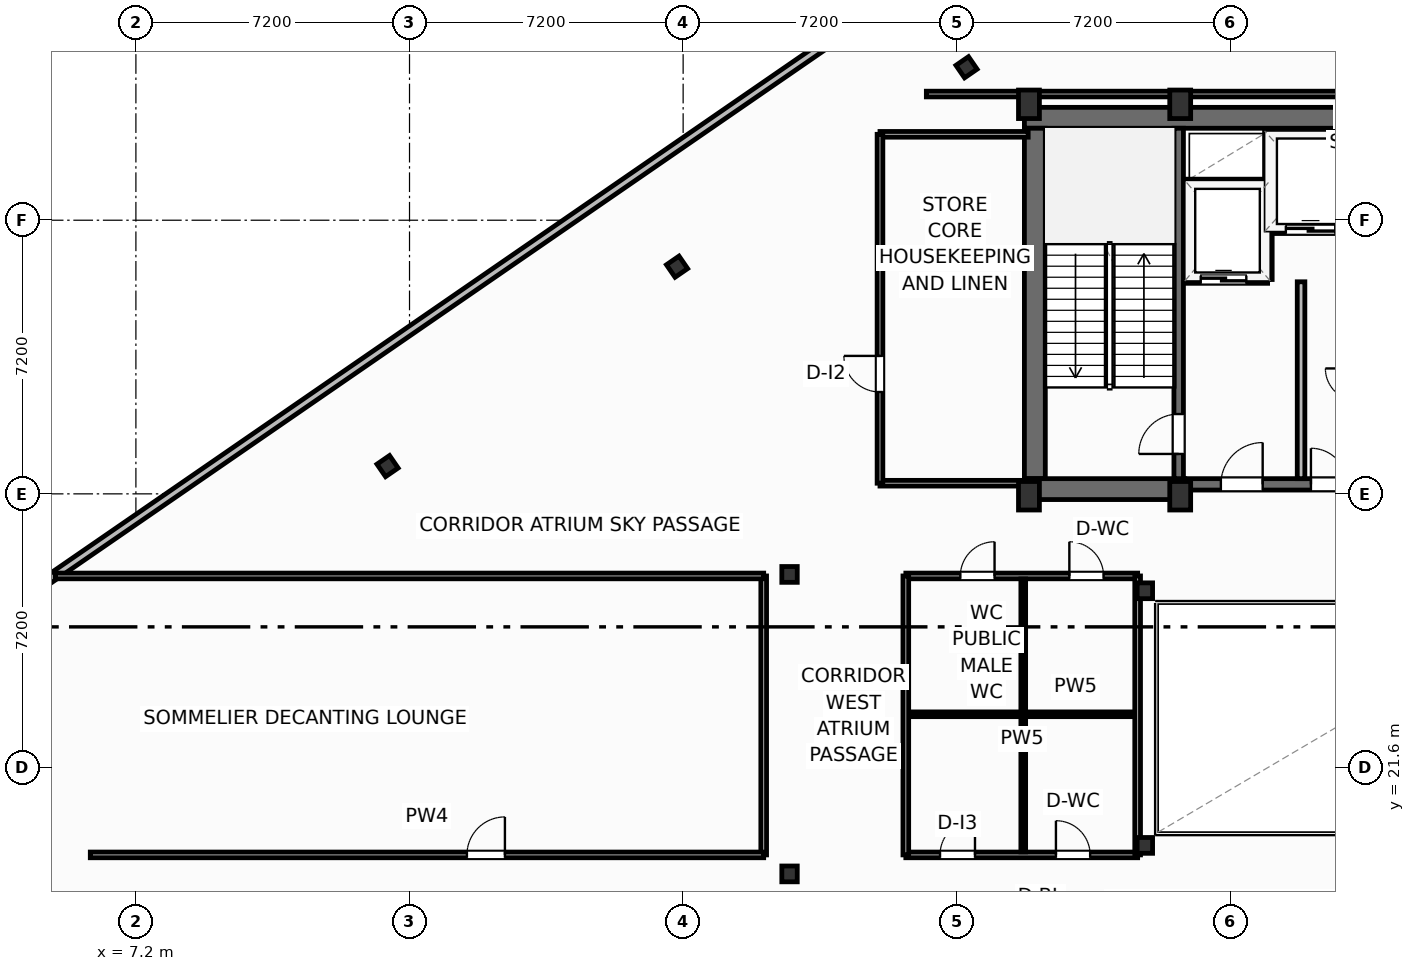
"""IFC4 building model, lengths in metres.
Left out: names, types, materials, properties, quantities, classifications, styles, units other than length and angle.
Written with IfcOpenShell. Run it as: python <this file> out.ifc"""

import sys

from ifc_helpers import new_model, si_unit, direction, frame, frame_2d, origin, origin_2d, place, context, subcontext, project, spatial, rectangle, i_section, extrude, element, fill, save


model = new_model("IFC4")
c1 = context("Model", 3, precision=1e-05, world=origin(), true_north=direction((0.0, 1.0)))
c2 = subcontext(c1, "Body", "Model", "MODEL_VIEW")
j1 = project(units=[si_unit("LENGTHUNIT", "METRE"), si_unit("PLANEANGLEUNIT", "RADIAN")], contexts=[c1])
p1 = place(None, origin())
s1 = spatial("IfcSite", under=j1, at=p1, CompositionType="ELEMENT")
p2 = place(p1, origin())
s2 = spatial("IfcBuilding", under=s1, at=p2, CompositionType="ELEMENT")
p3 = place(p2, frame((0.0, 0.0, 291.5)))
s3 = spatial("IfcBuildingStorey", under=s2, at=p3, CompositionType="ELEMENT", Elevation=291.5)
for number, where, z_axis, x_axis in (
    (1, (30.7, 28.75, 0.0), (0.0, 0.0, 1.0), (1.0, 0.0, 0.0)),
    (2, (34.68, 28.75, 0.0), (0.0, 0.0, 1.0), (1.0, 0.0, 0.0)),
    (3, (30.7, 39.05, 0.0), (0.0, 0.0, 1.0), (1.0, 0.0, 0.0)),
    (4, (34.68, 39.05, 0.0), (0.0, 0.0, 1.0), (1.0, 0.0, 0.0)),
):
    element("IfcColumn", number, at=place(p3, frame(where, z_axis=z_axis, x_axis=x_axis)), inside=s3, PredefinedType="COLUMN", context=c2, shape_type="SweptSolid", body=[
        extrude(rectangle(XDim=0.55, YDim=0.75, at=origin_2d()), origin(), (0.0, 0.0, 1.0), 4.8),
    ])
for number, where, z_axis, x_axis in (
    (5, (33.75, 19.55, 0.0), (0.0, 0.0, 1.0), (1.0, 0.0, 0.0)),
    (6, (33.75, 26.25, 0.0), (0.0, 0.0, 1.0), (1.0, 0.0, 0.0)),
    (7, (24.4, 18.8, 0.0), (0.0, 0.0, 1.0), (1.0, 0.0, 0.0)),
    (8, (24.4, 26.68, 0.0), (0.0, 0.0, 1.0), (1.0, 0.0, 0.0)),
):
    element("IfcColumn", number, at=place(p3, frame(where, z_axis=z_axis, x_axis=x_axis)), inside=s3, PredefinedType="COLUMN", context=c2, shape_type="SweptSolid", body=[
        extrude(i_section(OverallWidth=0.406, OverallDepth=0.416, WebThickness=0.03, FlangeThickness=0.048, FilletRadius=0.025, at=origin_2d()), origin(), (0.0, 0.0, 1.0), 4.8),
    ])
p4 = place(p3, frame((30.58, 38.695, 0.0), z_axis=(0.0, 0.0, 1.0), x_axis=(1.0, 0.0, 0.0)))
e9 = element("IfcWall", 9, at=p4, inside=s3, PredefinedType="SHEAR", context=c2, shape_type="SweptSolid", body=[
    extrude(rectangle(XDim=17.24, YDim=0.55, at=frame_2d((8.62, 0.0))), origin(), (0.0, 0.0, 1.0), 4.48),
])
p5 = place(p3, frame((30.855, 29.2, 0.0), z_axis=(0.0, 0.0, 1.0), x_axis=(0.0, 1.0, 0.0)))
e10 = element("IfcWall", 10, at=p5, inside=s3, PredefinedType="SHEAR", context=c2, shape_type="SweptSolid", body=[
    extrude(rectangle(XDim=9.22, YDim=0.55, at=frame_2d((4.61, 0.0))), origin(), (0.0, 0.0, 1.0), 4.48),
])
p6 = place(p3, frame((30.58, 28.925, 0.0), z_axis=(0.0, 0.0, 1.0), x_axis=(1.0, 0.0, 0.0)))
e11 = element("IfcWall", 11, at=p6, inside=s3, PredefinedType="SHEAR", context=c2, shape_type="SweptSolid", body=[
    extrude(rectangle(XDim=4.22, YDim=0.55, at=frame_2d((2.11, 0.0))), origin(), (0.0, 0.0, 1.0), 4.48),
])
p7 = place(p3, frame((34.8, 29.05, 0.0), z_axis=(0.0, 0.0, 1.0), x_axis=(1.0, 0.0, 0.0)))
e12 = element("IfcWall", 12, at=p7, inside=s3, PredefinedType="SHEAR", context=c2, shape_type="SweptSolid", body=[
    extrude(rectangle(XDim=8.8, YDim=0.3, at=frame_2d((4.4, 0.0))), origin(), (0.0, 0.0, 1.0), 4.48),
])
p8 = place(p7, frame((0.95, 0.0, 0.0)))
e13 = element("IfcOpeningElement", 13, at=p8, cuts=e12, PredefinedType="OPENING", context=c2, shape_type="SweptSolid", body=[
    extrude(rectangle(XDim=1.1, YDim=2.15, at=frame_2d((0.55, 1.075))), frame((0.0, 0.16, 0.0), z_axis=(0.0, -1.0, 0.0), x_axis=(1.0, 0.0, 0.0)), (0.0, 0.0, 1.0), 0.32),
])
p9 = place(p7, frame((6.75, 0.0, 0.0)))
e14 = element("IfcOpeningElement", 14, at=p9, cuts=e12, PredefinedType="OPENING", context=c2, shape_type="SweptSolid", body=[
    extrude(rectangle(XDim=1.1, YDim=2.15, at=frame_2d((0.55, 1.075))), frame((0.0, 0.16, 0.0), z_axis=(0.0, -1.0, 0.0), x_axis=(1.0, 0.0, 0.0)), (0.0, 0.0, 1.0), 0.32),
])
p10 = place(p7, frame((3.32, 0.0, 0.0)))
e15 = element("IfcOpeningElement", 15, at=p10, cuts=e12, PredefinedType="OPENING", context=c2, shape_type="SweptSolid", body=[
    extrude(rectangle(XDim=0.95, YDim=2.15, at=frame_2d((0.475, 1.075))), frame((0.0, 0.16, 0.0), z_axis=(0.0, -1.0, 0.0), x_axis=(1.0, 0.0, 0.0)), (0.0, 0.0, 1.0), 0.32),
])
p11 = place(p3, frame((34.64, 29.2, 0.0), z_axis=(0.0, 0.0, 1.0), x_axis=(0.0, 1.0, 0.0)))
e16 = element("IfcWall", 16, at=p11, inside=s3, PredefinedType="SHEAR", context=c2, shape_type="SweptSolid", body=[
    extrude(rectangle(XDim=9.22, YDim=0.25, at=frame_2d((4.61, 0.0))), origin(), (0.0, 0.0, 1.0), 4.48),
])
p12 = place(p11, frame((0.65, 0.0, 0.0)))
e17 = element("IfcOpeningElement", 17, at=p12, cuts=e16, PredefinedType="OPENING", context=c2, shape_type="SweptSolid", body=[
    extrude(rectangle(XDim=1.05, YDim=2.15, at=frame_2d((0.525, 1.075))), frame((0.0, 0.135, 0.0), z_axis=(0.0, -1.0, 0.0), x_axis=(1.0, 0.0, 0.0)), (0.0, 0.0, 1.0), 0.27),
])
for number, where, z_axis, x_axis in (
    (18, (29.057, 40.025, 0.0), (0.0, 0.0, 1.0), (0.824, 0.567, 0.0)),
    (19, (21.44, 34.778, 0.0), (0.0, 0.0, 1.0), (0.824, 0.567, 0.0)),
    (20, (13.822, 29.53, 0.0), (0.0, 0.0, 1.0), (0.824, 0.567, 0.0)),
):
    element("IfcColumn", number, at=place(p3, frame(where, z_axis=z_axis, x_axis=x_axis)), inside=s3, PredefinedType="COLUMN", context=c2, shape_type="SweptSolid", body=[
        extrude(i_section(OverallWidth=0.401, OverallDepth=0.399, WebThickness=0.025, FlangeThickness=0.04, FilletRadius=0.022, at=origin_2d()), origin(), (0.0, 0.0, 1.0), 4.8),
    ])
p13 = place(p3, frame((27.693, -7.489, 0.0), z_axis=(0.0, 0.0, 1.0), x_axis=(0.733009701217, 0.680218184057, 0.0)))
e21 = element("IfcWall", 21, at=p13, inside=s3, PredefinedType="SOLIDWALL", context=c2, shape_type="SweptSolid", body=[
    extrude(rectangle(XDim=66.428, YDim=0.22, at=frame_2d((33.214, 0.0))), origin(), (0.0, 0.0, 1.0), 2.265),
])
p14 = place(p13, frame((32.014, 0.0, 0.8)))
e22 = element("IfcOpeningElement", 22, at=p14, cuts=e21, PredefinedType="OPENING", context=c2, shape_type="SweptSolid", body=[
    extrude(rectangle(XDim=2.4, YDim=1.385, at=frame_2d((1.2, 0.692))), frame((0.0, 0.12, 0.0), z_axis=(0.0, -1.0, 0.0), x_axis=(1.0, 0.0, 0.0)), (0.0, 0.0, 1.0), 0.24),
])
p15 = place(p3, frame((50.695, 58.086, 0.0), z_axis=(0.0, 0.0, 1.0), x_axis=(-0.823531024939, -0.567271232272, 0.0)))
e23 = element("IfcWall", 23, at=p15, inside=s3, PredefinedType="SOLIDWALL", context=c2, shape_type="SweptSolid", body=[
    extrude(rectangle(XDim=56.157, YDim=0.22, at=frame_2d((28.079, 0.0))), origin(), (0.0, 0.0, 1.0), 3.76),
])
p16 = place(p15, frame((26.879, 0.0, 0.8)))
e24 = element("IfcOpeningElement", 24, at=p16, cuts=e23, PredefinedType="OPENING", context=c2, shape_type="SweptSolid", body=[
    extrude(rectangle(XDim=2.4, YDim=1.85, at=frame_2d((1.2, 0.925))), frame((0.0, 0.12, 0.0), z_axis=(0.0, -1.0, 0.0), x_axis=(1.0, 0.0, 0.0)), (0.0, 0.0, 1.0), 0.24),
])
p17 = place(p3, frame((27.46, 26.64, 0.0), z_axis=(0.0, 0.0, 1.0), x_axis=(1.0, 0.0, 0.0)))
e25 = element("IfcWall", 25, at=p17, inside=s3, PredefinedType="PARTITIONING", context=c2, shape_type="SweptSolid", body=[
    extrude(rectangle(XDim=6.1, YDim=0.15, at=frame_2d((3.05, 0.0))), origin(), (0.0, 0.0, 1.0), 3.692),
])
p18 = place(p17, frame((4.303, 0.0, 0.0)))
e26 = element("IfcOpeningElement", 26, at=p18, cuts=e25, PredefinedType="OPENING", context=c2, shape_type="SweptSolid", body=[
    extrude(rectangle(XDim=0.9, YDim=2.05, at=frame_2d((0.45, 1.025))), frame((0.0, 0.085, 0.0), z_axis=(0.0, -1.0, 0.0), x_axis=(1.0, 0.0, 0.0)), (0.0, 0.0, 1.0), 0.17),
])
p19 = place(p17, frame((1.435, 0.0, 0.0)))
e27 = element("IfcOpeningElement", 27, at=p19, cuts=e25, PredefinedType="OPENING", context=c2, shape_type="SweptSolid", body=[
    extrude(rectangle(XDim=0.9, YDim=2.05, at=frame_2d((0.45, 1.025))), frame((0.0, 0.085, 0.0), z_axis=(0.0, -1.0, 0.0), x_axis=(1.0, 0.0, 0.0)), (0.0, 0.0, 1.0), 0.17),
])
p20 = place(p3, frame((27.46, 19.3, 0.0), z_axis=(0.0, 0.0, 1.0), x_axis=(1.0, 0.0, 0.0)))
e28 = element("IfcWall", 28, at=p20, inside=s3, PredefinedType="PARTITIONING", context=c2, shape_type="SweptSolid", body=[
    extrude(rectangle(XDim=6.1, YDim=0.15, at=frame_2d((3.05, 0.0))), origin(), (0.0, 0.0, 1.0), 3.692),
])
p21 = place(p20, frame((0.9, 0.0, 0.0)))
e29 = element("IfcOpeningElement", 29, at=p21, cuts=e28, PredefinedType="OPENING", context=c2, shape_type="SweptSolid", body=[
    extrude(rectangle(XDim=0.92, YDim=2.05, at=frame_2d((0.46, 1.025))), frame((0.0, 0.085, 0.0), z_axis=(0.0, -1.0, 0.0), x_axis=(1.0, 0.0, 0.0)), (0.0, 0.0, 1.0), 0.17),
])
p22 = place(p20, frame((3.95, 0.0, 0.0)))
e30 = element("IfcOpeningElement", 30, at=p22, cuts=e28, PredefinedType="OPENING", context=c2, shape_type="SweptSolid", body=[
    extrude(rectangle(XDim=0.9, YDim=2.05, at=frame_2d((0.45, 1.025))), frame((0.0, 0.085, 0.0), z_axis=(0.0, -1.0, 0.0), x_axis=(1.0, 0.0, 0.0)), (0.0, 0.0, 1.0), 0.17),
])
p23 = place(p3, frame((30.55, 19.38, 0.0), z_axis=(0.0, 0.0, 1.0), x_axis=(0.0, 1.0, 0.0)))
e31 = element("IfcWall", 31, at=p23, inside=s3, PredefinedType="PARTITIONING", context=c2, shape_type="SweptSolid", body=[
    extrude(rectangle(XDim=7.18, YDim=0.125, at=frame_2d((3.59, 0.0))), origin(), (0.0, 0.0, 1.0), 4.48),
])
p24 = place(p3, frame((27.52, 23.0, 0.0), z_axis=(0.0, 0.0, 1.0), x_axis=(1.0, 0.0, 0.0)))
e32 = element("IfcWall", 32, at=p24, inside=s3, PredefinedType="PARTITIONING", context=c2, shape_type="SweptSolid", body=[
    extrude(rectangle(XDim=6.0, YDim=0.125, at=frame_2d((3.0, 0.0))), origin(), (0.0, 0.0, 1.0), 4.48),
])
p25 = place(p3, frame((27.46, 19.3, 0.0), z_axis=(0.0, 0.0, 1.0), x_axis=(0.0, 1.0, 0.0)))
e33 = element("IfcWall", 33, at=p25, inside=s3, PredefinedType="PARTITIONING", context=c2, shape_type="SweptSolid", body=[
    extrude(rectangle(XDim=7.34, YDim=0.15, at=frame_2d((3.67, 0.0))), origin(), (0.0, 0.0, 1.0), 4.48),
])
p26 = place(p3, frame((33.56, 19.3, 0.0), z_axis=(0.0, 0.0, 1.0), x_axis=(0.0, 1.0, 0.0)))
e34 = element("IfcWall", 34, at=p26, inside=s3, PredefinedType="PARTITIONING", context=c2, shape_type="SweptSolid", body=[
    extrude(rectangle(XDim=7.34, YDim=0.15, at=frame_2d((3.67, 0.0))), origin(), (0.0, 0.0, 1.0), 2.265),
])
p27 = place(p3, frame((23.72, 19.3, 0.0), z_axis=(0.0, 0.0, 1.0), x_axis=(0.0, 1.0, 0.0)))
e35 = element("IfcWall", 35, at=p27, inside=s3, PredefinedType="PARTITIONING", context=c2, shape_type="SweptSolid", body=[
    extrude(rectangle(XDim=7.34, YDim=0.15, at=frame_2d((3.67, 0.0))), origin(), (0.0, 0.0, 1.0), 4.48),
])
p28 = place(p3, frame((6.0, 19.3, 0.0), z_axis=(0.0, 0.0, 1.0), x_axis=(1.0, 0.0, 0.0)))
e36 = element("IfcWall", 36, at=p28, inside=s3, PredefinedType="PARTITIONING", context=c2, shape_type="SweptSolid", body=[
    extrude(rectangle(XDim=17.72, YDim=0.15, at=frame_2d((8.86, 0.0))), origin(), (0.0, 0.0, 1.0), 4.48),
])
p29 = place(p28, frame((9.91, 0.0, 0.0)))
e37 = element("IfcOpeningElement", 37, at=p29, cuts=e36, PredefinedType="OPENING", context=c2, shape_type="SweptSolid", body=[
    extrude(rectangle(XDim=1.0, YDim=2.05, at=frame_2d((0.5, 1.025))), frame((0.0, 0.085, 0.0), z_axis=(0.0, -1.0, 0.0), x_axis=(1.0, 0.0, 0.0)), (0.0, 0.0, 1.0), 0.17),
])
p30 = place(p3, frame((5.078, 26.64, 0.0), z_axis=(0.0, 0.0, 1.0), x_axis=(1.0, 0.0, 0.0)))
e38 = element("IfcWall", 38, at=p30, inside=s3, PredefinedType="PARTITIONING", context=c2, shape_type="SweptSolid", body=[
    extrude(rectangle(XDim=18.642, YDim=0.15, at=frame_2d((9.321, 0.0))), origin(), (0.0, 0.0, 1.0), 2.265),
])
p31 = place(p3, frame((28.0, 39.32, 0.0), z_axis=(0.0, 0.0, 1.0), x_axis=(1.0, 0.0, 0.0)))
e39 = element("IfcWall", 39, at=p31, inside=s3, PredefinedType="PARTITIONING", context=c2, shape_type="SweptSolid", body=[
    extrude(rectangle(XDim=28.45, YDim=0.15, at=frame_2d((14.225, 0.0))), origin(), (0.0, 0.0, 1.0), 4.48),
])
p32 = place(p31, frame((24.6, 0.0, 0.0)))
e40 = element("IfcOpeningElement", 40, at=p32, cuts=e39, PredefinedType="OPENING", context=c2, shape_type="SweptSolid", body=[
    extrude(rectangle(XDim=1.0, YDim=2.05, at=frame_2d((0.5, 1.025))), frame((0.0, 0.085, 0.0), z_axis=(0.0, -1.0, 0.0), x_axis=(1.0, 0.0, 0.0)), (0.0, 0.0, 1.0), 0.17),
])
p33 = place(p3, frame((37.86, 29.2, 0.0), z_axis=(0.0, 0.0, 1.0), x_axis=(0.0, 1.0, 0.0)))
e41 = element("IfcWall", 41, at=p33, inside=s3, PredefinedType="PARTITIONING", context=c2, shape_type="SweptSolid", body=[
    extrude(rectangle(XDim=5.18, YDim=0.2, at=frame_2d((2.59, 0.0))), origin(), (0.0, 0.0, 1.0), 4.48),
])
p34 = place(p3, frame((34.8, 34.44, 0.0), z_axis=(0.0, 0.0, 1.0), x_axis=(1.0, 0.0, 0.0)))
e42 = element("IfcWall", 42, at=p34, inside=s3, PredefinedType="PARTITIONING", context=c2, shape_type="SweptSolid", body=[
    extrude(rectangle(XDim=2.18, YDim=0.2, at=frame_2d((1.09, 0.0))), origin(), (0.0, 0.0, 1.0), 4.48),
])
p35 = place(p34, frame((0.42, 0.0, 0.0)))
e43 = element("IfcOpeningElement", 43, at=p35, cuts=e42, PredefinedType="OPENING", context=c2, shape_type="SweptSolid", body=[
    extrude(rectangle(XDim=1.2, YDim=2.2, at=frame_2d((0.6, 1.1))), frame((0.0, 0.11, 0.0), z_axis=(0.0, -1.0, 0.0), x_axis=(1.0, 0.0, 0.0)), (0.0, 0.0, 1.0), 0.22),
])
p36 = place(p3, frame((34.8, 36.98, 0.0), z_axis=(0.0, 0.0, 1.0), x_axis=(1.0, 0.0, 0.0)))
e44 = element("IfcWall", 44, at=p36, inside=s3, PredefinedType="PARTITIONING", context=c2, shape_type="SweptSolid", body=[
    extrude(rectangle(XDim=2.18, YDim=0.2, at=frame_2d((1.09, 0.0))), origin(), (0.0, 0.0, 1.0), 4.48),
])
p37 = place(p3, frame((37.0, 34.44, 0.0), z_axis=(0.0, 0.0, 1.0), x_axis=(0.0, 1.0, 0.0)))
e45 = element("IfcWall", 45, at=p37, inside=s3, PredefinedType="PARTITIONING", context=c2, shape_type="SweptSolid", body=[
    extrude(rectangle(XDim=3.9, YDim=0.2, at=frame_2d((1.95, 0.0))), origin(), (0.0, 0.0, 1.0), 4.48),
])
p38 = place(p3, frame((37.06, 35.75, 0.0), z_axis=(0.0, 0.0, 1.0), x_axis=(1.0, 0.0, 0.0)))
e46 = element("IfcWall", 46, at=p38, inside=s3, PredefinedType="PARTITIONING", context=c2, shape_type="SweptSolid", body=[
    extrude(rectangle(XDim=2.12, YDim=0.2, at=frame_2d((1.06, 0.0))), origin(), (0.0, 0.0, 1.0), 4.48),
])
p39 = place(p38, frame((0.4, 0.0, 0.0)))
e47 = element("IfcOpeningElement", 47, at=p39, cuts=e46, PredefinedType="OPENING", context=c2, shape_type="SweptSolid", body=[
    extrude(rectangle(XDim=1.3, YDim=2.2, at=frame_2d((0.65, 1.1))), frame((0.0, 0.11, 0.0), z_axis=(0.0, -1.0, 0.0), x_axis=(1.0, 0.0, 0.0)), (0.0, 0.0, 1.0), 0.22),
])
p40 = place(p3, frame((26.78, 29.08, 0.0), z_axis=(0.0, 0.0, 1.0), x_axis=(1.0, 0.0, 0.0)))
e48 = element("IfcWall", 48, at=p40, inside=s3, PredefinedType="PARTITIONING", context=c2, shape_type="SweptSolid", body=[
    extrude(rectangle(XDim=3.8, YDim=0.15, at=frame_2d((1.9, 0.0))), origin(), (0.0, 0.0, 1.0), 4.48),
])
p41 = place(p3, frame((26.78, 38.26, 0.0), z_axis=(0.0, 0.0, 1.0), x_axis=(1.0, 0.0, 0.0)))
e49 = element("IfcWall", 49, at=p41, inside=s3, PredefinedType="PARTITIONING", context=c2, shape_type="SweptSolid", body=[
    extrude(rectangle(XDim=3.9, YDim=0.15, at=frame_2d((1.95, 0.0))), origin(), (0.0, 0.0, 1.0), 4.48),
])
p42 = place(p3, frame((26.78, 29.08, 0.0), z_axis=(0.0, 0.0, 1.0), x_axis=(0.0, 1.0, 0.0)))
e50 = element("IfcWall", 50, at=p42, inside=s3, PredefinedType="PARTITIONING", context=c2, shape_type="SweptSolid", body=[
    extrude(rectangle(XDim=9.18, YDim=0.15, at=frame_2d((4.59, 0.0))), origin(), (0.0, 0.0, 1.0), 4.48),
])
p43 = place(p42, frame((2.4, 0.0, 0.0)))
e51 = element("IfcOpeningElement", 51, at=p43, cuts=e50, PredefinedType="OPENING", context=c2, shape_type="SweptSolid", body=[
    extrude(rectangle(XDim=0.95, YDim=2.05, at=frame_2d((0.475, 1.025))), frame((0.0, 0.085, 0.0), z_axis=(0.0, -1.0, 0.0), x_axis=(1.0, 0.0, 0.0)), (0.0, 0.0, 1.0), 0.17),
])
p44 = place(p18, origin())
e52 = element("IfcDoor", 52, at=p44, inside=s3, OperationType="SINGLE_SWING_LEFT", PredefinedType="DOOR", context=c2, shape_type="SweptSolid", body=[
    extrude(rectangle(XDim=0.9, YDim=2.05, at=frame_2d((0.45, 1.025))), frame((0.0, 0.025, 0.0), z_axis=(0.0, -1.0, 0.0), x_axis=(1.0, 0.0, 0.0)), (0.0, 0.0, 1.0), 0.05),
])
fill(e26, e52)
p45 = place(p19, origin())
e53 = element("IfcDoor", 53, at=p45, inside=s3, OperationType="SINGLE_SWING_RIGHT", PredefinedType="DOOR", context=c2, shape_type="SweptSolid", body=[
    extrude(rectangle(XDim=0.9, YDim=2.05, at=frame_2d((0.45, 1.025))), frame((0.0, 0.025, 0.0), z_axis=(0.0, -1.0, 0.0), x_axis=(1.0, 0.0, 0.0)), (0.0, 0.0, 1.0), 0.05),
])
fill(e27, e53)
p46 = place(p21, origin())
e54 = element("IfcDoor", 54, at=p46, inside=s3, OperationType="SINGLE_SWING_RIGHT", PredefinedType="DOOR", context=c2, shape_type="SweptSolid", body=[
    extrude(rectangle(XDim=0.92, YDim=2.05, at=frame_2d((0.46, 1.025))), frame((0.0, 0.025, 0.0), z_axis=(0.0, -1.0, 0.0), x_axis=(1.0, 0.0, 0.0)), (0.0, 0.0, 1.0), 0.05),
])
fill(e29, e54)
p47 = place(p22, origin())
e55 = element("IfcDoor", 55, at=p47, inside=s3, OperationType="SINGLE_SWING_LEFT", PredefinedType="DOOR", context=c2, shape_type="SweptSolid", body=[
    extrude(rectangle(XDim=0.9, YDim=2.05, at=frame_2d((0.45, 1.025))), frame((0.0, 0.025, 0.0), z_axis=(0.0, -1.0, 0.0), x_axis=(1.0, 0.0, 0.0)), (0.0, 0.0, 1.0), 0.05),
])
fill(e30, e55)
p48 = place(p29, origin())
e56 = element("IfcDoor", 56, at=p48, inside=s3, OperationType="SINGLE_SWING_RIGHT", PredefinedType="DOOR", context=c2, shape_type="SweptSolid", body=[
    extrude(rectangle(XDim=1.0, YDim=2.05, at=frame_2d((0.5, 1.025))), frame((0.0, 0.025, 0.0), z_axis=(0.0, -1.0, 0.0), x_axis=(1.0, 0.0, 0.0)), (0.0, 0.0, 1.0), 0.05),
])
fill(e37, e56)
p49 = place(p12, origin())
e57 = element("IfcDoor", 57, at=p49, inside=s3, OperationType="SINGLE_SWING_LEFT", PredefinedType="DOOR", context=c2, shape_type="SweptSolid", body=[
    extrude(rectangle(XDim=1.05, YDim=2.15, at=frame_2d((0.525, 1.075))), frame((0.0, 0.025, 0.0), z_axis=(0.0, -1.0, 0.0), x_axis=(1.0, 0.0, 0.0)), (0.0, 0.0, 1.0), 0.05),
])
fill(e17, e57)
p50 = place(p8, origin())
e58 = element("IfcDoor", 58, at=p50, inside=s3, OperationType="SINGLE_SWING_RIGHT", PredefinedType="DOOR", context=c2, shape_type="SweptSolid", body=[
    extrude(rectangle(XDim=1.1, YDim=2.15, at=frame_2d((0.55, 1.075))), frame((0.0, 0.025, 0.0), z_axis=(0.0, -1.0, 0.0), x_axis=(1.0, 0.0, 0.0)), (0.0, 0.0, 1.0), 0.05),
])
fill(e13, e58)
p51 = place(p35, origin())
e59 = element("IfcDoor", 59, at=p51, inside=s3, OperationType="SLIDING_TO_LEFT", PredefinedType="DOOR", context=c2, shape_type="SweptSolid", body=[
    extrude(rectangle(XDim=1.2, YDim=2.2, at=frame_2d((0.6, 1.1))), frame((0.0, 0.025, 0.0), z_axis=(0.0, -1.0, 0.0), x_axis=(1.0, 0.0, 0.0)), (0.0, 0.0, 1.0), 0.05),
])
fill(e43, e59)
p52 = place(p39, origin())
e60 = element("IfcDoor", 60, at=p52, inside=s3, OperationType="SLIDING_TO_LEFT", PredefinedType="DOOR", context=c2, shape_type="SweptSolid", body=[
    extrude(rectangle(XDim=1.3, YDim=2.2, at=frame_2d((0.65, 1.1))), frame((0.0, 0.025, 0.0), z_axis=(0.0, -1.0, 0.0), x_axis=(1.0, 0.0, 0.0)), (0.0, 0.0, 1.0), 0.05),
])
fill(e47, e60)
p53 = place(p10, origin())
e61 = element("IfcDoor", 61, at=p53, inside=s3, OperationType="SINGLE_SWING_LEFT", PredefinedType="DOOR", context=c2, shape_type="SweptSolid", body=[
    extrude(rectangle(XDim=0.95, YDim=2.15, at=frame_2d((0.475, 1.075))), frame((0.0, 0.025, 0.0), z_axis=(0.0, -1.0, 0.0), x_axis=(1.0, 0.0, 0.0)), (0.0, 0.0, 1.0), 0.05),
])
fill(e15, e61)
p54 = place(p43, origin())
e62 = element("IfcDoor", 62, at=p54, inside=s3, OperationType="SINGLE_SWING_RIGHT", PredefinedType="DOOR", context=c2, shape_type="SweptSolid", body=[
    extrude(rectangle(XDim=0.95, YDim=2.05, at=frame_2d((0.475, 1.025))), frame((0.0, 0.025, 0.0), z_axis=(0.0, -1.0, 0.0), x_axis=(1.0, 0.0, 0.0)), (0.0, 0.0, 1.0), 0.05),
])
fill(e51, e62)
save(model, sys.argv[1])
